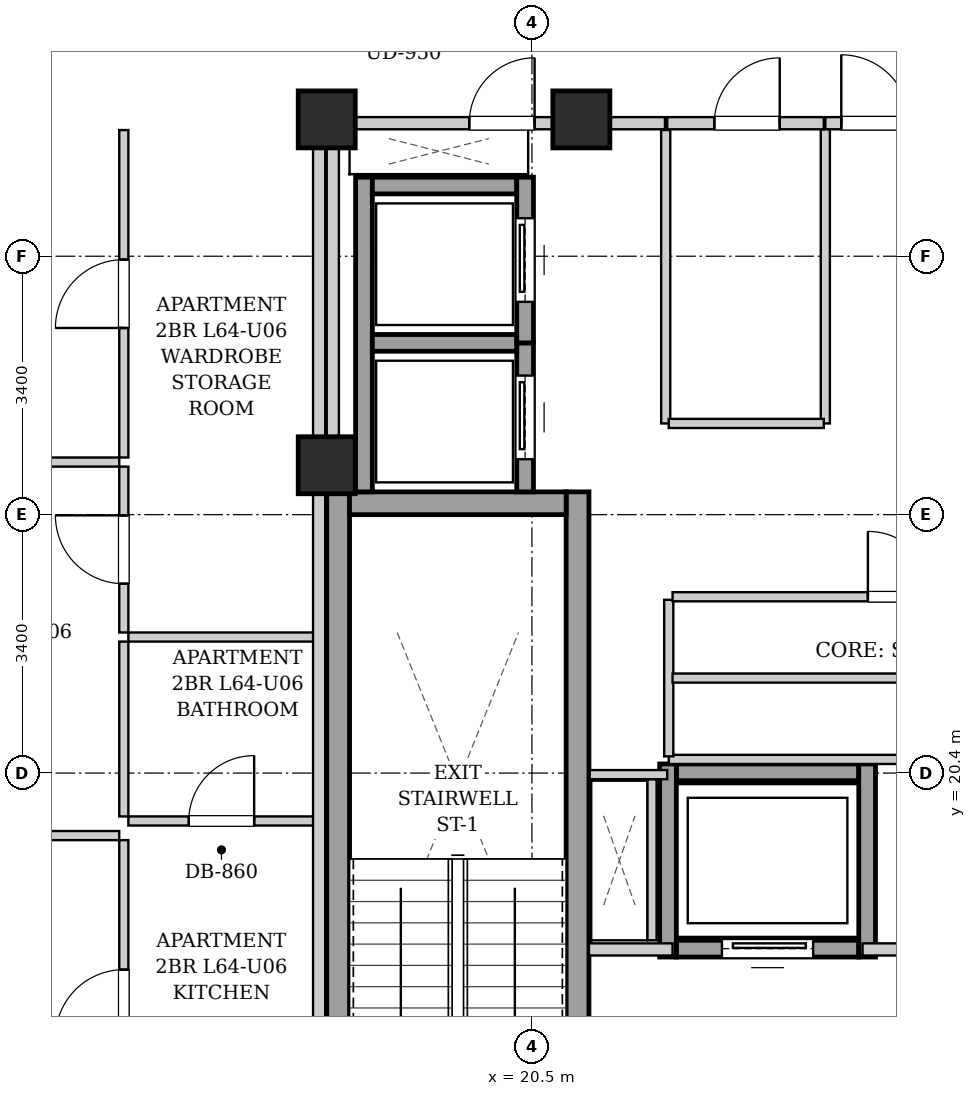
"""IFC4 building model, lengths in metres.
Left out: names, types, materials, properties, quantities, classifications, styles, units other than length and angle.
Written with IfcOpenShell. Run it as: python <this file> out.ifc"""

import sys

from ifc_helpers import new_model, si_unit, direction, frame, frame_2d, origin, origin_2d, place, context, subcontext, project, spatial, rectangle, extrude, element, fill, save


model = new_model("IFC4")
c1 = context("Model", 3, precision=1e-05, world=origin(), true_north=direction((0.0, 1.0)))
c2 = subcontext(c1, "Body", "Model", "MODEL_VIEW")
j1 = project(units=[si_unit("LENGTHUNIT", "METRE"), si_unit("PLANEANGLEUNIT", "RADIAN")], contexts=[c1])
p1 = place(None, origin())
s1 = spatial("IfcSite", under=j1, at=p1, CompositionType="ELEMENT")
p2 = place(p1, origin())
s2 = spatial("IfcBuilding", under=s1, at=p2, CompositionType="ELEMENT")
p3 = place(p2, frame((0.0, 0.0, 220.7)))
s3 = spatial("IfcBuildingStorey", under=s2, at=p3, CompositionType="ELEMENT", Elevation=220.7)
for number, where, z_axis, x_axis in (
    (1, (17.8, 29.0, 0.0), (0.0, 0.0, 1.0), (1.0, 0.0, 0.0)),
    (2, (21.15, 29.0, 0.0), (0.0, 0.0, 1.0), (1.0, 0.0, 0.0)),
    (3, (17.8, 24.45, 0.0), (0.0, 0.0, 1.0), (1.0, 0.0, 0.0)),
):
    element("IfcColumn", number, at=place(p3, frame(where, z_axis=z_axis, x_axis=x_axis)), inside=s3, PredefinedType="COLUMN", context=c2, shape_type="SweptSolid", body=[
        extrude(rectangle(XDim=0.75, YDim=0.75, at=origin_2d()), origin(), (0.0, 0.0, 1.0), 3.4),
    ])
for number, where, z_axis, x_axis in (
    (4, (17.95, 15.1, 0.0), (0.0, 0.0, 1.0), (0.0, 1.0, 0.0)),
    (5, (21.1, 15.1, 0.0), (0.0, 0.0, 1.0), (0.0, 1.0, 0.0)),
):
    element("IfcWall", number, at=place(p3, frame(where, z_axis=z_axis, x_axis=x_axis)), inside=s3, PredefinedType="SHEAR", context=c2, shape_type="SweptSolid", body=[
        extrude(rectangle(XDim=9.0, YDim=0.3, at=frame_2d((4.5, 0.0))), origin(), (0.0, 0.0, 1.0), 3.14),
    ])
p4 = place(p3, frame((18.1, 23.95, 0.0), z_axis=(0.0, 0.0, 1.0), x_axis=(1.0, 0.0, 0.0)))
e6 = element("IfcWall", 6, at=p4, inside=s3, PredefinedType="SHEAR", context=c2, shape_type="SweptSolid", body=[
    extrude(rectangle(XDim=2.85, YDim=0.3, at=frame_2d((1.425, 0.0))), origin(), (0.0, 0.0, 1.0), 3.14),
])
p5 = place(p3, frame((18.29, 24.1, 0.0), z_axis=(0.0, 0.0, 1.0), x_axis=(0.0, 1.0, 0.0)))
e7 = element("IfcWall", 7, at=p5, inside=s3, PredefinedType="SHEAR", context=c2, shape_type="SweptSolid", body=[
    extrude(rectangle(XDim=4.14, YDim=0.22, at=frame_2d((2.07, 0.0))), origin(), (0.0, 0.0, 1.0), 3.14),
])
p6 = place(p3, frame((20.41, 24.1, 0.0), z_axis=(0.0, 0.0, 1.0), x_axis=(0.0, 1.0, 0.0)))
e8 = element("IfcWall", 8, at=p6, inside=s3, PredefinedType="SHEAR", context=c2, shape_type="SweptSolid", body=[
    extrude(rectangle(XDim=1.96, YDim=0.22, at=frame_2d((0.98, 0.0))), origin(), (0.0, 0.0, 1.0), 3.14),
])
p7 = place(p6, frame((0.43, 0.0, 0.0)))
e9 = element("IfcOpeningElement", 9, at=p7, cuts=e8, PredefinedType="OPENING", context=c2, shape_type="SweptSolid", body=[
    extrude(rectangle(XDim=1.1, YDim=2.15, at=frame_2d((0.55, 1.075))), frame((0.0, 0.12, 0.0), z_axis=(0.0, -1.0, 0.0), x_axis=(1.0, 0.0, 0.0)), (0.0, 0.0, 1.0), 0.24),
])
for number, where, z_axis, x_axis in (
    (10, (18.4, 26.06, 0.0), (0.0, 0.0, 1.0), (1.0, 0.0, 0.0)),
    (11, (18.4, 28.13, 0.0), (0.0, 0.0, 1.0), (1.0, 0.0, 0.0)),
):
    element("IfcWall", number, at=place(p3, frame(where, z_axis=z_axis, x_axis=x_axis)), inside=s3, PredefinedType="SHEAR", context=c2, shape_type="SweptSolid", body=[
        extrude(rectangle(XDim=1.9, YDim=0.22, at=frame_2d((0.95, 0.0))), origin(), (0.0, 0.0, 1.0), 3.14),
    ])
p8 = place(p3, frame((20.41, 26.06, 0.0), z_axis=(0.0, 0.0, 1.0), x_axis=(0.0, 1.0, 0.0)))
e12 = element("IfcWall", 12, at=p8, inside=s3, PredefinedType="SHEAR", context=c2, shape_type="SweptSolid", body=[
    extrude(rectangle(XDim=2.18, YDim=0.22, at=frame_2d((1.09, 0.0))), origin(), (0.0, 0.0, 1.0), 3.14),
])
p9 = place(p8, frame((0.54, 0.0, 0.0)))
e13 = element("IfcOpeningElement", 13, at=p9, cuts=e12, PredefinedType="OPENING", context=c2, shape_type="SweptSolid", body=[
    extrude(rectangle(XDim=1.1, YDim=2.15, at=frame_2d((0.55, 1.075))), frame((0.0, 0.12, 0.0), z_axis=(0.0, -1.0, 0.0), x_axis=(1.0, 0.0, 0.0)), (0.0, 0.0, 1.0), 0.24),
])
p10 = place(p3, frame((22.4, 18.09, 0.0), z_axis=(0.0, 0.0, 1.0), x_axis=(1.0, 0.0, 0.0)))
e14 = element("IfcWall", 14, at=p10, inside=s3, PredefinedType="SHEAR", context=c2, shape_type="SweptSolid", body=[
    extrude(rectangle(XDim=2.4, YDim=0.22, at=frame_2d((1.2, 0.0))), origin(), (0.0, 0.0, 1.0), 3.14),
])
p11 = place(p10, frame((0.6, 0.0, 0.0)))
e15 = element("IfcOpeningElement", 15, at=p11, cuts=e14, PredefinedType="OPENING", context=c2, shape_type="SweptSolid", body=[
    extrude(rectangle(XDim=1.2, YDim=2.15, at=frame_2d((0.6, 1.075))), frame((0.0, 0.12, 0.0), z_axis=(0.0, -1.0, 0.0), x_axis=(1.0, 0.0, 0.0)), (0.0, 0.0, 1.0), 0.24),
])
p12 = place(p3, frame((22.4, 20.41, 0.0), z_axis=(0.0, 0.0, 1.0), x_axis=(1.0, 0.0, 0.0)))
e16 = element("IfcWall", 16, at=p12, inside=s3, PredefinedType="SHEAR", context=c2, shape_type="SweptSolid", body=[
    extrude(rectangle(XDim=2.4, YDim=0.22, at=frame_2d((1.2, 0.0))), origin(), (0.0, 0.0, 1.0), 3.14),
])
for number, where, z_axis, x_axis in (
    (17, (22.29, 17.98, 0.0), (0.0, 0.0, 1.0), (0.0, 1.0, 0.0)),
    (18, (24.91, 17.98, 0.0), (0.0, 0.0, 1.0), (0.0, 1.0, 0.0)),
):
    element("IfcWall", number, at=place(p3, frame(where, z_axis=z_axis, x_axis=x_axis)), inside=s3, PredefinedType="SHEAR", context=c2, shape_type="SweptSolid", body=[
        extrude(rectangle(XDim=2.54, YDim=0.22, at=frame_2d((1.27, 0.0))), origin(), (0.0, 0.0, 1.0), 3.14),
    ])
p13 = place(p3, frame((21.25, 18.08, 0.0), z_axis=(0.0, 0.0, 1.0), x_axis=(1.0, 0.0, 0.0)))
e19 = element("IfcWall", 19, at=p13, inside=s3, PredefinedType="PARTITIONING", context=c2, shape_type="SweptSolid", body=[
    extrude(rectangle(XDim=1.1, YDim=0.16, at=frame_2d((0.55, 0.0))), origin(), (0.0, 0.0, 1.0), 3.14),
])
p14 = place(p3, frame((24.85, 18.08, 0.0), z_axis=(0.0, 0.0, 1.0), x_axis=(1.0, 0.0, 0.0)))
e20 = element("IfcWall", 20, at=p14, inside=s3, PredefinedType="PARTITIONING", context=c2, shape_type="SweptSolid", body=[
    extrude(rectangle(XDim=1.3, YDim=0.16, at=frame_2d((0.65, 0.0))), origin(), (0.0, 0.0, 1.0), 3.14),
])
p15 = place(p3, frame((17.88, 24.12, 0.0), z_axis=(0.0, 0.0, 1.0), x_axis=(0.0, 1.0, 0.0)))
e21 = element("IfcWall", 21, at=p15, inside=s3, PredefinedType="PARTITIONING", context=c2, shape_type="SweptSolid", body=[
    extrude(rectangle(XDim=4.76, YDim=0.16, at=frame_2d((2.38, 0.0))), origin(), (0.0, 0.0, 1.0), 3.14),
])
p16 = place(p3, frame((24.36, 28.95, 0.0), z_axis=(0.0, 0.0, 1.0), x_axis=(1.0, 0.0, 0.0)))
e22 = element("IfcWall", 22, at=p16, inside=s3, PredefinedType="PARTITIONING", context=c2, shape_type="SweptSolid", body=[
    extrude(rectangle(XDim=1.32, YDim=0.16, at=frame_2d((0.66, 0.0))), origin(), (0.0, 0.0, 1.0), 2.668),
])
p17 = place(p16, frame((0.21, 0.0, 0.0)))
e23 = element("IfcOpeningElement", 23, at=p17, cuts=e22, PredefinedType="OPENING", context=c2, shape_type="SweptSolid", body=[
    extrude(rectangle(XDim=0.9, YDim=2.05, at=frame_2d((0.45, 1.025))), frame((0.0, 0.09, 0.0), z_axis=(0.0, -1.0, 0.0), x_axis=(1.0, 0.0, 0.0)), (0.0, 0.0, 1.0), 0.18),
])
p18 = place(p3, frame((17.96, 28.95, 0.0), z_axis=(0.0, 0.0, 1.0), x_axis=(1.0, 0.0, 0.0)))
e24 = element("IfcWall", 24, at=p18, inside=s3, PredefinedType="PARTITIONING", context=c2, shape_type="SweptSolid", body=[
    extrude(rectangle(XDim=4.29, YDim=0.16, at=frame_2d((2.145, 0.0))), origin(), (0.0, 0.0, 1.0), 2.668),
])
p19 = place(p18, frame((1.715, 0.0, 0.0)))
e25 = element("IfcOpeningElement", 25, at=p19, cuts=e24, PredefinedType="OPENING", context=c2, shape_type="SweptSolid", body=[
    extrude(rectangle(XDim=0.86, YDim=2.05, at=frame_2d((0.43, 1.025))), frame((0.0, 0.09, 0.0), z_axis=(0.0, -1.0, 0.0), x_axis=(1.0, 0.0, 0.0)), (0.0, 0.0, 1.0), 0.18),
])
p20 = place(p3, frame((22.08, 18.2, 0.0), z_axis=(0.0, 0.0, 1.0), x_axis=(0.0, 1.0, 0.0)))
e26 = element("IfcWall", 26, at=p20, inside=s3, PredefinedType="PARTITIONING", context=c2, shape_type="SweptSolid", body=[
    extrude(rectangle(XDim=2.12, YDim=0.12, at=frame_2d((1.06, 0.0))), origin(), (0.0, 0.0, 1.0), 3.14),
])
p21 = place(p3, frame((22.28, 20.38, 0.0), z_axis=(0.0, 0.0, 1.0), x_axis=(-1.0, 0.0, 0.0)))
e27 = element("IfcWall", 27, at=p21, inside=s3, PredefinedType="PARTITIONING", context=c2, shape_type="SweptSolid", body=[
    extrude(rectangle(XDim=1.02, YDim=0.12, at=frame_2d((0.51, 0.0))), origin(), (0.0, 0.0, 1.0), 3.14),
])
p22 = place(p3, frame((24.36, 25.0, 0.0), z_axis=(0.0, 0.0, 1.0), x_axis=(0.0, 1.0, 0.0)))
e28 = element("IfcWall", 28, at=p22, inside=s3, PredefinedType="PARTITIONING", context=c2, shape_type="SweptSolid", body=[
    extrude(rectangle(XDim=3.87, YDim=0.12, at=frame_2d((1.935, 0.0))), origin(), (0.0, 0.0, 1.0), 3.14),
])
p23 = place(p3, frame((22.26, 25.0, 0.0), z_axis=(0.0, 0.0, 1.0), x_axis=(0.0, 1.0, 0.0)))
e29 = element("IfcWall", 29, at=p23, inside=s3, PredefinedType="PARTITIONING", context=c2, shape_type="SweptSolid", body=[
    extrude(rectangle(XDim=3.86, YDim=0.12, at=frame_2d((1.93, 0.0))), origin(), (0.0, 0.0, 1.0), 3.14),
])
p24 = place(p3, frame((22.3, 25.0, 0.0), z_axis=(0.0, 0.0, 1.0), x_axis=(1.0, 0.0, 0.0)))
e30 = element("IfcWall", 30, at=p24, inside=s3, PredefinedType="PARTITIONING", context=c2, shape_type="SweptSolid", body=[
    extrude(rectangle(XDim=2.04, YDim=0.12, at=frame_2d((1.02, 0.0))), origin(), (0.0, 0.0, 1.0), 3.14),
])
p25 = place(p3, frame((22.28, 28.95, 0.0), z_axis=(0.0, 0.0, 1.0), x_axis=(1.0, 0.0, 0.0)))
e31 = element("IfcWall", 31, at=p25, inside=s3, PredefinedType="PARTITIONING", context=c2, shape_type="SweptSolid", body=[
    extrude(rectangle(XDim=2.06, YDim=0.16, at=frame_2d((1.03, 0.0))), origin(), (0.0, 0.0, 1.0), 2.668),
])
p26 = place(p25, frame((0.62, 0.0, 0.0)))
e32 = element("IfcOpeningElement", 32, at=p26, cuts=e31, PredefinedType="OPENING", context=c2, shape_type="SweptSolid", body=[
    extrude(rectangle(XDim=0.86, YDim=2.05, at=frame_2d((0.43, 1.025))), frame((0.0, 0.09, 0.0), z_axis=(0.0, -1.0, 0.0), x_axis=(1.0, 0.0, 0.0)), (0.0, 0.0, 1.0), 0.18),
])
p27 = place(p3, frame((22.3, 20.58, 0.0), z_axis=(0.0, 0.0, 1.0), x_axis=(1.0, 0.0, 0.0)))
e33 = element("IfcWall", 33, at=p27, inside=s3, PredefinedType="PARTITIONING", context=c2, shape_type="SweptSolid", body=[
    extrude(rectangle(XDim=7.35, YDim=0.12, at=frame_2d((3.675, 0.0))), origin(), (0.0, 0.0, 1.0), 3.14),
])
p28 = place(p3, frame((22.3, 20.62, 0.0), z_axis=(0.0, 0.0, 1.0), x_axis=(0.0, 1.0, 0.0)))
e34 = element("IfcWall", 34, at=p28, inside=s3, PredefinedType="PARTITIONING", context=c2, shape_type="SweptSolid", body=[
    extrude(rectangle(XDim=2.06, YDim=0.12, at=frame_2d((1.03, 0.0))), origin(), (0.0, 0.0, 1.0), 3.14),
])
p29 = place(p3, frame((22.35, 21.65, 0.0), z_axis=(0.0, 0.0, 1.0), x_axis=(1.0, 0.0, 0.0)))
e35 = element("IfcWall", 35, at=p29, inside=s3, PredefinedType="PARTITIONING", context=c2, shape_type="SweptSolid", body=[
    extrude(rectangle(XDim=5.79, YDim=0.12, at=frame_2d((2.895, 0.0))), origin(), (0.0, 0.0, 1.0), 3.14),
])
p30 = place(p3, frame((22.35, 22.72, 0.0), z_axis=(0.0, 0.0, 1.0), x_axis=(1.0, 0.0, 0.0)))
e36 = element("IfcWall", 36, at=p30, inside=s3, PredefinedType="PARTITIONING", context=c2, shape_type="SweptSolid", body=[
    extrude(rectangle(XDim=7.27, YDim=0.12, at=frame_2d((3.635, 0.0))), origin(), (0.0, 0.0, 1.0), 3.14),
])
p31 = place(p30, frame((2.57, 0.0, 0.0)))
e37 = element("IfcOpeningElement", 37, at=p31, cuts=e36, PredefinedType="OPENING", context=c2, shape_type="SweptSolid", body=[
    extrude(rectangle(XDim=0.86, YDim=2.05, at=frame_2d((0.43, 1.025))), frame((0.0, 0.07, 0.0), z_axis=(0.0, -1.0, 0.0), x_axis=(1.0, 0.0, 0.0)), (0.0, 0.0, 1.0), 0.14),
])
p32 = place(p30, frame((6.06, 0.0, 0.0)))
e38 = element("IfcOpeningElement", 38, at=p32, cuts=e36, PredefinedType="OPENING", context=c2, shape_type="SweptSolid", body=[
    extrude(rectangle(XDim=0.86, YDim=2.05, at=frame_2d((0.43, 1.025))), frame((0.0, 0.07, 0.0), z_axis=(0.0, -1.0, 0.0), x_axis=(1.0, 0.0, 0.0)), (0.0, 0.0, 1.0), 0.14),
])
p33 = place(p3, frame((15.19, 22.19, 0.0), z_axis=(0.0, 0.0, 1.0), x_axis=(1.0, 0.0, 0.0)))
e39 = element("IfcWall", 39, at=p33, inside=s3, PredefinedType="PARTITIONING", context=c2, shape_type="SweptSolid", body=[
    extrude(rectangle(XDim=2.45, YDim=0.12, at=frame_2d((1.225, 0.0))), origin(), (0.0, 0.0, 1.0), 3.14),
])
p34 = place(p3, frame((15.13, 22.25, 0.0), z_axis=(0.0, 0.0, 1.0), x_axis=(0.0, 1.0, 0.0)))
e40 = element("IfcWall", 40, at=p34, inside=s3, PredefinedType="PARTITIONING", context=c2, shape_type="SweptSolid", body=[
    extrude(rectangle(XDim=2.182, YDim=0.12, at=frame_2d((1.091, 0.0))), origin(), (0.0, 0.0, 1.0), 3.14),
])
p35 = place(p34, frame((0.641, 0.0, 0.0)))
e41 = element("IfcOpeningElement", 41, at=p35, cuts=e40, PredefinedType="OPENING", context=c2, shape_type="SweptSolid", body=[
    extrude(rectangle(XDim=0.9, YDim=2.05, at=frame_2d((0.45, 1.025))), frame((0.0, 0.07, 0.0), z_axis=(0.0, -1.0, 0.0), x_axis=(1.0, 0.0, 0.0)), (0.0, 0.0, 1.0), 0.14),
])
p36 = place(p3, frame((15.13, 24.552, 0.0), z_axis=(0.0, 0.0, 1.0), x_axis=(0.0, 1.0, 0.0)))
e42 = element("IfcWall", 42, at=p36, inside=s3, PredefinedType="PARTITIONING", context=c2, shape_type="SweptSolid", body=[
    extrude(rectangle(XDim=4.308, YDim=0.12, at=frame_2d((2.154, 0.0))), origin(), (0.0, 0.0, 1.0), 3.14),
])
p37 = place(p36, frame((1.704, 0.0, 0.0)))
e43 = element("IfcOpeningElement", 43, at=p37, cuts=e42, PredefinedType="OPENING", context=c2, shape_type="SweptSolid", body=[
    extrude(rectangle(XDim=0.9, YDim=2.05, at=frame_2d((0.45, 1.025))), frame((0.0, 0.07, 0.0), z_axis=(0.0, -1.0, 0.0), x_axis=(1.0, 0.0, 0.0)), (0.0, 0.0, 1.0), 0.14),
])
p38 = place(p3, frame((15.19, 19.77, 0.0), z_axis=(0.0, 0.0, 1.0), x_axis=(1.0, 0.0, 0.0)))
e44 = element("IfcWall", 44, at=p38, inside=s3, PredefinedType="PARTITIONING", context=c2, shape_type="SweptSolid", body=[
    extrude(rectangle(XDim=2.45, YDim=0.12, at=frame_2d((1.225, 0.0))), origin(), (0.0, 0.0, 1.0), 3.14),
])
p39 = place(p38, frame((0.795, 0.0, 0.0)))
e45 = element("IfcOpeningElement", 45, at=p39, cuts=e44, PredefinedType="OPENING", context=c2, shape_type="SweptSolid", body=[
    extrude(rectangle(XDim=0.86, YDim=2.05, at=frame_2d((0.43, 1.025))), frame((0.0, 0.07, 0.0), z_axis=(0.0, -1.0, 0.0), x_axis=(1.0, 0.0, 0.0)), (0.0, 0.0, 1.0), 0.14),
])
p40 = place(p3, frame((15.13, 19.83, 0.0), z_axis=(0.0, 0.0, 1.0), x_axis=(0.0, 1.0, 0.0)))
e46 = element("IfcWall", 46, at=p40, inside=s3, PredefinedType="PARTITIONING", context=c2, shape_type="SweptSolid", body=[
    extrude(rectangle(XDim=2.3, YDim=0.12, at=frame_2d((1.15, 0.0))), origin(), (0.0, 0.0, 1.0), 3.14),
])
p41 = place(p3, frame((15.13, 15.21, 0.0), z_axis=(0.0, 0.0, 1.0), x_axis=(0.0, 1.0, 0.0)))
e47 = element("IfcWall", 47, at=p41, inside=s3, PredefinedType="PARTITIONING", context=c2, shape_type="SweptSolid", body=[
    extrude(rectangle(XDim=4.308, YDim=0.12, at=frame_2d((2.154, 0.0))), origin(), (0.0, 0.0, 1.0), 3.14),
])
p42 = place(p41, frame((1.704, 0.0, 0.0)))
e48 = element("IfcOpeningElement", 48, at=p42, cuts=e47, PredefinedType="OPENING", context=c2, shape_type="SweptSolid", body=[
    extrude(rectangle(XDim=0.9, YDim=2.05, at=frame_2d((0.45, 1.025))), frame((0.0, 0.07, 0.0), z_axis=(0.0, -1.0, 0.0), x_axis=(1.0, 0.0, 0.0)), (0.0, 0.0, 1.0), 0.14),
])
p43 = place(p3, frame((10.88, 19.578, 0.0), z_axis=(0.0, 0.0, 1.0), x_axis=(1.0, 0.0, 0.0)))
e49 = element("IfcWall", 49, at=p43, inside=s3, PredefinedType="PARTITIONING", context=c2, shape_type="SweptSolid", body=[
    extrude(rectangle(XDim=4.19, YDim=0.12, at=frame_2d((2.095, 0.0))), origin(), (0.0, 0.0, 1.0), 3.14),
])
p44 = place(p43, frame((1.63, 0.0, 0.0)))
e50 = element("IfcOpeningElement", 50, at=p44, cuts=e49, PredefinedType="OPENING", context=c2, shape_type="SweptSolid", body=[
    extrude(rectangle(XDim=0.9, YDim=2.05, at=frame_2d((0.45, 1.025))), frame((0.0, 0.07, 0.0), z_axis=(0.0, -1.0, 0.0), x_axis=(1.0, 0.0, 0.0)), (0.0, 0.0, 1.0), 0.14),
])
p45 = place(p3, frame((10.88, 24.492, 0.0), z_axis=(0.0, 0.0, 1.0), x_axis=(1.0, 0.0, 0.0)))
e51 = element("IfcWall", 51, at=p45, inside=s3, PredefinedType="PARTITIONING", context=c2, shape_type="SweptSolid", body=[
    extrude(rectangle(XDim=4.19, YDim=0.12, at=frame_2d((2.095, 0.0))), origin(), (0.0, 0.0, 1.0), 2.878),
])
p46 = place(p45, frame((1.63, 0.0, 0.0)))
e52 = element("IfcOpeningElement", 52, at=p46, cuts=e51, PredefinedType="OPENING", context=c2, shape_type="SweptSolid", body=[
    extrude(rectangle(XDim=0.9, YDim=2.05, at=frame_2d((0.45, 1.025))), frame((0.0, 0.07, 0.0), z_axis=(0.0, -1.0, 0.0), x_axis=(1.0, 0.0, 0.0)), (0.0, 0.0, 1.0), 0.14),
])
p47 = place(p3, frame((17.7, 15.02, 0.0), z_axis=(0.0, 0.0, 1.0), x_axis=(0.0, 1.0, 0.0)))
e53 = element("IfcWall", 53, at=p47, inside=s3, PredefinedType="PARTITIONING", context=c2, shape_type="SweptSolid", body=[
    extrude(rectangle(XDim=13.98, YDim=0.16, at=frame_2d((6.99, 0.0))), origin(), (0.0, 0.0, 1.0), 3.14),
])
p48 = place(p7, origin())
e54 = element("IfcDoor", 54, at=p48, inside=s3, OperationType="SLIDING_TO_LEFT", PredefinedType="DOOR", context=c2, shape_type="SweptSolid", body=[
    extrude(rectangle(XDim=1.1, YDim=2.15, at=frame_2d((0.55, 1.075))), frame((0.0, 0.025, 0.0), z_axis=(0.0, -1.0, 0.0), x_axis=(1.0, 0.0, 0.0)), (0.0, 0.0, 1.0), 0.05),
])
fill(e9, e54)
p49 = place(p9, origin())
e55 = element("IfcDoor", 55, at=p49, inside=s3, OperationType="SLIDING_TO_LEFT", PredefinedType="DOOR", context=c2, shape_type="SweptSolid", body=[
    extrude(rectangle(XDim=1.1, YDim=2.15, at=frame_2d((0.55, 1.075))), frame((0.0, 0.025, 0.0), z_axis=(0.0, -1.0, 0.0), x_axis=(1.0, 0.0, 0.0)), (0.0, 0.0, 1.0), 0.05),
])
fill(e13, e55)
p50 = place(p11, origin())
e56 = element("IfcDoor", 56, at=p50, inside=s3, OperationType="SLIDING_TO_LEFT", PredefinedType="DOOR", context=c2, shape_type="SweptSolid", body=[
    extrude(rectangle(XDim=1.2, YDim=2.15, at=frame_2d((0.6, 1.075))), frame((0.0, 0.025, 0.0), z_axis=(0.0, -1.0, 0.0), x_axis=(1.0, 0.0, 0.0)), (0.0, 0.0, 1.0), 0.05),
])
fill(e15, e56)
p51 = place(p17, origin())
e57 = element("IfcDoor", 57, at=p51, inside=s3, OperationType="SINGLE_SWING_LEFT", PredefinedType="DOOR", context=c2, shape_type="SweptSolid", body=[
    extrude(rectangle(XDim=0.9, YDim=2.05, at=frame_2d((0.45, 1.025))), frame((0.0, 0.025, 0.0), z_axis=(0.0, -1.0, 0.0), x_axis=(1.0, 0.0, 0.0)), (0.0, 0.0, 1.0), 0.05),
])
fill(e23, e57)
p52 = place(p19, origin())
e58 = element("IfcDoor", 58, at=p52, inside=s3, OperationType="SINGLE_SWING_RIGHT", PredefinedType="DOOR", context=c2, shape_type="SweptSolid", body=[
    extrude(rectangle(XDim=0.86, YDim=2.05, at=frame_2d((0.43, 1.025))), frame((0.0, 0.025, 0.0), z_axis=(0.0, -1.0, 0.0), x_axis=(1.0, 0.0, 0.0)), (0.0, 0.0, 1.0), 0.05),
])
fill(e25, e58)
p53 = place(p26, origin())
e59 = element("IfcDoor", 59, at=p53, inside=s3, OperationType="SINGLE_SWING_RIGHT", PredefinedType="DOOR", context=c2, shape_type="SweptSolid", body=[
    extrude(rectangle(XDim=0.86, YDim=2.05, at=frame_2d((0.43, 1.025))), frame((0.0, 0.025, 0.0), z_axis=(0.0, -1.0, 0.0), x_axis=(1.0, 0.0, 0.0)), (0.0, 0.0, 1.0), 0.05),
])
fill(e32, e59)
p54 = place(p31, origin())
e60 = element("IfcDoor", 60, at=p54, inside=s3, OperationType="SINGLE_SWING_LEFT", PredefinedType="DOOR", context=c2, shape_type="SweptSolid", body=[
    extrude(rectangle(XDim=0.86, YDim=2.05, at=frame_2d((0.43, 1.025))), frame((0.0, 0.025, 0.0), z_axis=(0.0, -1.0, 0.0), x_axis=(1.0, 0.0, 0.0)), (0.0, 0.0, 1.0), 0.05),
])
fill(e37, e60)
p55 = place(p35, origin())
e61 = element("IfcDoor", 61, at=p55, inside=s3, OperationType="SINGLE_SWING_RIGHT", PredefinedType="DOOR", context=c2, shape_type="SweptSolid", body=[
    extrude(rectangle(XDim=0.9, YDim=2.05, at=frame_2d((0.45, 1.025))), frame((0.0, 0.025, 0.0), z_axis=(0.0, -1.0, 0.0), x_axis=(1.0, 0.0, 0.0)), (0.0, 0.0, 1.0), 0.05),
])
fill(e41, e61)
p56 = place(p37, origin())
e62 = element("IfcDoor", 62, at=p56, inside=s3, OperationType="SINGLE_SWING_LEFT", PredefinedType="DOOR", context=c2, shape_type="SweptSolid", body=[
    extrude(rectangle(XDim=0.9, YDim=2.05, at=frame_2d((0.45, 1.025))), frame((0.0, 0.025, 0.0), z_axis=(0.0, -1.0, 0.0), x_axis=(1.0, 0.0, 0.0)), (0.0, 0.0, 1.0), 0.05),
])
fill(e43, e62)
p57 = place(p39, origin())
e63 = element("IfcDoor", 63, at=p57, inside=s3, OperationType="SINGLE_SWING_RIGHT", PredefinedType="DOOR", context=c2, shape_type="SweptSolid", body=[
    extrude(rectangle(XDim=0.86, YDim=2.05, at=frame_2d((0.43, 1.025))), frame((0.0, 0.025, 0.0), z_axis=(0.0, -1.0, 0.0), x_axis=(1.0, 0.0, 0.0)), (0.0, 0.0, 1.0), 0.05),
])
fill(e45, e63)
p58 = place(p42, origin())
e64 = element("IfcDoor", 64, at=p58, inside=s3, OperationType="SINGLE_SWING_LEFT", PredefinedType="DOOR", context=c2, shape_type="SweptSolid", body=[
    extrude(rectangle(XDim=0.9, YDim=2.05, at=frame_2d((0.45, 1.025))), frame((0.0, 0.025, 0.0), z_axis=(0.0, -1.0, 0.0), x_axis=(1.0, 0.0, 0.0)), (0.0, 0.0, 1.0), 0.05),
])
fill(e48, e64)
save(model, sys.argv[1])
